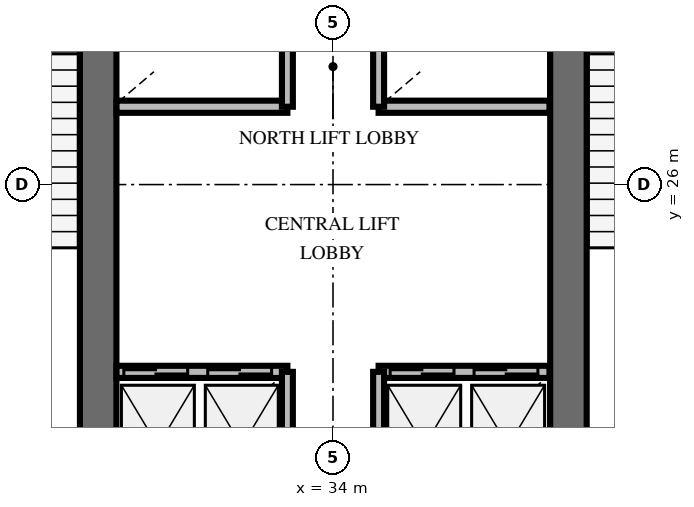
"""IFC4 building model, lengths in metres.
Left out: names, types, materials, properties, quantities, classifications, styles, units other than length and angle.
Written with IfcOpenShell. Run it as: python <this file> out.ifc"""

import sys

from ifc_helpers import new_model, si_unit, direction, frame, frame_2d, origin, place, context, subcontext, project, spatial, rectangle, extrude, element, fill, save


model = new_model("IFC4")
c1 = context("Model", 3, precision=1e-05, world=origin(), true_north=direction((0.0, 1.0)))
c2 = subcontext(c1, "Body", "Model", "MODEL_VIEW")
j1 = project(units=[si_unit("LENGTHUNIT", "METRE"), si_unit("PLANEANGLEUNIT", "RADIAN")], contexts=[c1])
p1 = place(None, origin())
s1 = spatial("IfcSite", under=j1, at=p1, CompositionType="ELEMENT")
p2 = place(p1, origin())
s2 = spatial("IfcBuilding", under=s1, at=p2, CompositionType="ELEMENT")
p3 = place(p2, frame((0.0, 0.0, 137.8)))
s3 = spatial("IfcBuildingStorey", under=s2, at=p3, CompositionType="ELEMENT", Elevation=137.8)
for number, where, z_axis, x_axis in (
    (1, (30.138, 20.187, 0.0), (0.0, 0.0, 1.0), (0.0, 1.0, 0.0)),
    (2, (37.872, 20.187, 0.0), (0.0, 0.0, 1.0), (0.0, 1.0, 0.0)),
):
    element("IfcWall", number, at=place(p3, frame(where, z_axis=z_axis, x_axis=x_axis)), inside=s3, PredefinedType="SHEAR", context=c2, shape_type="SweptSolid", body=[
        extrude(rectangle(XDim=9.826, YDim=0.6, at=frame_2d((4.913, 0.0))), origin(), (0.0, 0.0, 1.0), 4.0),
    ])
p4 = place(p3, frame((30.44, 22.92, 0.0), z_axis=(0.0, 0.0, 1.0), x_axis=(1.0, 0.0, 0.0)))
e3 = element("IfcWall", 3, at=p4, inside=s3, PredefinedType="SOLIDWALL", context=c2, shape_type="SweptSolid", body=[
    extrude(rectangle(XDim=2.81, YDim=0.2, at=frame_2d((1.405, 0.0))), origin(), (0.0, 0.0, 1.0), 2.8),
])
p5 = place(p4, frame((0.12, 0.0, 0.0)))
e4 = element("IfcOpeningElement", 4, at=p5, cuts=e3, PredefinedType="OPENING", context=c2, shape_type="SweptSolid", body=[
    extrude(rectangle(XDim=1.05, YDim=2.1, at=frame_2d((0.525, 1.05))), frame((0.0, 0.11, 0.0), z_axis=(0.0, -1.0, 0.0), x_axis=(1.0, 0.0, 0.0)), (0.0, 0.0, 1.0), 0.22),
])
p6 = place(p4, frame((1.5, 0.0, 0.0)))
e5 = element("IfcOpeningElement", 5, at=p6, cuts=e3, PredefinedType="OPENING", context=c2, shape_type="SweptSolid", body=[
    extrude(rectangle(XDim=1.05, YDim=2.1, at=frame_2d((0.525, 1.05))), frame((0.0, 0.11, 0.0), z_axis=(0.0, -1.0, 0.0), x_axis=(1.0, 0.0, 0.0)), (0.0, 0.0, 1.0), 0.22),
])
p7 = place(p3, frame((33.25, 20.5, 0.0), z_axis=(0.0, 0.0, 1.0), x_axis=(0.0, 1.0, 0.0)))
e6 = element("IfcWall", 6, at=p7, inside=s3, PredefinedType="SOLIDWALL", context=c2, shape_type="SweptSolid", body=[
    extrude(rectangle(XDim=2.42, YDim=0.18, at=frame_2d((1.21, 0.0))), origin(), (0.0, 0.0, 1.0), 2.8),
])
p8 = place(p3, frame((34.75, 22.92, 0.0), z_axis=(0.0, 0.0, 1.0), x_axis=(1.0, 0.0, 0.0)))
e7 = element("IfcWall", 7, at=p8, inside=s3, PredefinedType="SOLIDWALL", context=c2, shape_type="SweptSolid", body=[
    extrude(rectangle(XDim=2.81, YDim=0.2, at=frame_2d((1.405, 0.0))), origin(), (0.0, 0.0, 1.0), 2.8),
])
p9 = place(p8, frame((0.19, 0.0, 0.0)))
e8 = element("IfcOpeningElement", 8, at=p9, cuts=e7, PredefinedType="OPENING", context=c2, shape_type="SweptSolid", body=[
    extrude(rectangle(XDim=1.05, YDim=2.1, at=frame_2d((0.525, 1.05))), frame((0.0, 0.11, 0.0), z_axis=(0.0, -1.0, 0.0), x_axis=(1.0, 0.0, 0.0)), (0.0, 0.0, 1.0), 0.22),
])
p10 = place(p8, frame((1.57, 0.0, 0.0)))
e9 = element("IfcOpeningElement", 9, at=p10, cuts=e7, PredefinedType="OPENING", context=c2, shape_type="SweptSolid", body=[
    extrude(rectangle(XDim=1.05, YDim=2.1, at=frame_2d((0.525, 1.05))), frame((0.0, 0.11, 0.0), z_axis=(0.0, -1.0, 0.0), x_axis=(1.0, 0.0, 0.0)), (0.0, 0.0, 1.0), 0.22),
])
p11 = place(p3, frame((34.75, 20.5, 0.0), z_axis=(0.0, 0.0, 1.0), x_axis=(0.0, 1.0, 0.0)))
e10 = element("IfcWall", 10, at=p11, inside=s3, PredefinedType="SOLIDWALL", context=c2, shape_type="SweptSolid", body=[
    extrude(rectangle(XDim=2.42, YDim=0.18, at=frame_2d((1.21, 0.0))), origin(), (0.0, 0.0, 1.0), 2.8),
])
p12 = place(p3, frame((30.44, 27.28, 0.0), z_axis=(0.0, 0.0, 1.0), x_axis=(1.0, 0.0, 0.0)))
e11 = element("IfcWall", 11, at=p12, inside=s3, PredefinedType="SOLIDWALL", context=c2, shape_type="SweptSolid", body=[
    extrude(rectangle(XDim=2.81, YDim=0.2, at=frame_2d((1.405, 0.0))), origin(), (0.0, 0.0, 1.0), 2.8),
])
p13 = place(p3, frame((33.25, 27.28, 0.0), z_axis=(0.0, 0.0, 1.0), x_axis=(0.0, 1.0, 0.0)))
e12 = element("IfcWall", 12, at=p13, inside=s3, PredefinedType="SOLIDWALL", context=c2, shape_type="SweptSolid", body=[
    extrude(rectangle(XDim=2.47, YDim=0.18, at=frame_2d((1.235, 0.0))), origin(), (0.0, 0.0, 1.0), 2.8),
])
p14 = place(p3, frame((34.75, 27.28, 0.0), z_axis=(0.0, 0.0, 1.0), x_axis=(1.0, 0.0, 0.0)))
e13 = element("IfcWall", 13, at=p14, inside=s3, PredefinedType="SOLIDWALL", context=c2, shape_type="SweptSolid", body=[
    extrude(rectangle(XDim=2.81, YDim=0.2, at=frame_2d((1.405, 0.0))), origin(), (0.0, 0.0, 1.0), 2.8),
])
p15 = place(p3, frame((34.75, 27.28, 0.0), z_axis=(0.0, 0.0, 1.0), x_axis=(0.0, 1.0, 0.0)))
e14 = element("IfcWall", 14, at=p15, inside=s3, PredefinedType="SOLIDWALL", context=c2, shape_type="SweptSolid", body=[
    extrude(rectangle(XDim=2.47, YDim=0.18, at=frame_2d((1.235, 0.0))), origin(), (0.0, 0.0, 1.0), 2.8),
])
p16 = place(p5, origin())
e15 = element("IfcDoor", 15, at=p16, inside=s3, OperationType="DOUBLE_DOOR_SLIDING", PredefinedType="USERDEFINED", context=c2, shape_type="SweptSolid", body=[
    extrude(rectangle(XDim=1.05, YDim=2.1, at=frame_2d((0.525, 1.05))), frame((0.0, 0.025, 0.0), z_axis=(0.0, -1.0, 0.0), x_axis=(1.0, 0.0, 0.0)), (0.0, 0.0, 1.0), 0.05),
])
fill(e4, e15)
p17 = place(p6, origin())
e16 = element("IfcDoor", 16, at=p17, inside=s3, OperationType="DOUBLE_DOOR_SLIDING", PredefinedType="USERDEFINED", context=c2, shape_type="SweptSolid", body=[
    extrude(rectangle(XDim=1.05, YDim=2.1, at=frame_2d((0.525, 1.05))), frame((0.0, 0.025, 0.0), z_axis=(0.0, -1.0, 0.0), x_axis=(1.0, 0.0, 0.0)), (0.0, 0.0, 1.0), 0.05),
])
fill(e5, e16)
p18 = place(p9, origin())
e17 = element("IfcDoor", 17, at=p18, inside=s3, OperationType="DOUBLE_DOOR_SLIDING", PredefinedType="USERDEFINED", context=c2, shape_type="SweptSolid", body=[
    extrude(rectangle(XDim=1.05, YDim=2.1, at=frame_2d((0.525, 1.05))), frame((0.0, 0.025, 0.0), z_axis=(0.0, -1.0, 0.0), x_axis=(1.0, 0.0, 0.0)), (0.0, 0.0, 1.0), 0.05),
])
fill(e8, e17)
p19 = place(p10, origin())
e18 = element("IfcDoor", 18, at=p19, inside=s3, OperationType="DOUBLE_DOOR_SLIDING", PredefinedType="USERDEFINED", context=c2, shape_type="SweptSolid", body=[
    extrude(rectangle(XDim=1.05, YDim=2.1, at=frame_2d((0.525, 1.05))), frame((0.0, 0.025, 0.0), z_axis=(0.0, -1.0, 0.0), x_axis=(1.0, 0.0, 0.0)), (0.0, 0.0, 1.0), 0.05),
])
fill(e9, e18)
save(model, sys.argv[1])
